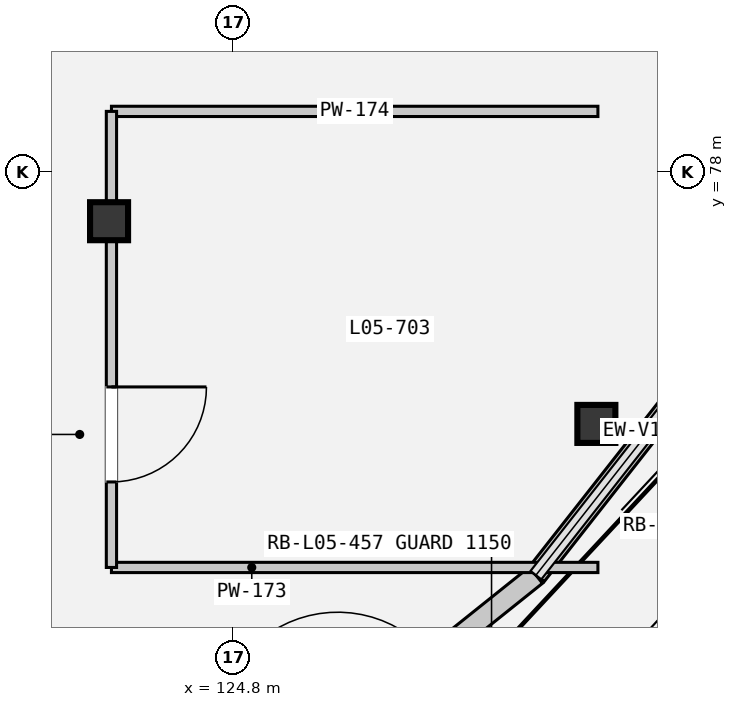
"""IFC4 building model, lengths in metres.
Left out: names, types, materials, properties, quantities, classifications, styles, units other than length and angle.
Written with IfcOpenShell. Run it as: python <this file> out.ifc"""

import sys

from ifc_helpers import new_model, si_unit, direction, frame, frame_2d, origin, origin_2d, place, context, subcontext, project, spatial, rectangle, extrude, element, fill, save


model = new_model("IFC4")
c1 = context("Model", 3, precision=1e-05, world=origin(), true_north=direction((0.0, 1.0)))
c2 = subcontext(c1, "Body", "Model", "MODEL_VIEW")
j1 = project(units=[si_unit("LENGTHUNIT", "METRE"), si_unit("PLANEANGLEUNIT", "RADIAN")], contexts=[c1])
p1 = place(None, origin())
s1 = spatial("IfcSite", under=j1, at=p1, CompositionType="ELEMENT")
p2 = place(p1, origin())
s2 = spatial("IfcBuilding", under=s1, at=p2, CompositionType="ELEMENT")
p3 = place(p2, frame((0.0, 0.0, 24.3)))
s3 = spatial("IfcBuildingStorey", under=s2, at=p3, CompositionType="ELEMENT", Elevation=24.3)
for number, where, z_axis, x_axis in (
    (1, (129.58, 74.688, 0.0), (0.0, 0.0, 1.0), (1.0, 0.0, 0.0)),
    (2, (123.169, 77.355, 0.0), (0.0, 0.0, 1.0), (1.0, 0.0, 0.0)),
):
    element("IfcColumn", number, at=place(p3, frame(where, z_axis=z_axis, x_axis=x_axis)), inside=s3, PredefinedType="COLUMN", context=c2, shape_type="SweptSolid", body=[
        extrude(rectangle(XDim=0.5, YDim=0.5, at=origin_2d()), origin(), (0.0, 0.0, 1.0), 4.5),
    ])
p4 = place(p3, frame((124.818, 69.524, 0.0), z_axis=(0.0, 0.0, 1.0), x_axis=(0.780742210705, 0.624853263113, 0.0)))
e3 = element("IfcWall", 3, at=p4, inside=s3, PredefinedType="SOLIDWALL", context=c2, shape_type="SweptSolid", body=[
    extrude(rectangle(XDim=5.081, YDim=0.275, at=frame_2d((2.54, 0.0))), origin(), (0.0, 0.0, 1.0), 3.58),
])
p5 = place(p4, frame((1.74, 0.0, 0.0)))
e4 = element("IfcOpeningElement", 4, at=p5, cuts=e3, PredefinedType="OPENING", context=c2, shape_type="SweptSolid", body=[
    extrude(rectangle(XDim=1.6, YDim=2.3, at=frame_2d((0.8, 1.15))), frame((0.0, 0.147, 0.0), z_axis=(0.0, -1.0, 0.0), x_axis=(1.0, 0.0, 0.0)), (0.0, 0.0, 1.0), 0.295),
])
p6 = place(p3, frame((128.785, 72.699, 0.0), z_axis=(0.0, 0.0, 1.0), x_axis=(0.617498011037, 0.786572441906, 0.0)))
e5 = element("IfcWall", 5, at=p6, inside=s3, PredefinedType="SOLIDWALL", context=c2, shape_type="SweptSolid", body=[
    extrude(rectangle(XDim=4.833, YDim=0.275, at=frame_2d((2.417, 0.0))), origin(), (0.0, 0.0, 1.0), 1.02),
])
for number, where, z_axis, x_axis in (
    (6, (123.2, 72.8, 0.0), (0.0, 0.0, 1.0), (1.0, 0.0, 0.0)),
    (7, (129.6, 78.8, 0.0), (0.0, 0.0, 1.0), (-1.0, 0.0, 0.0)),
):
    element("IfcWall", number, at=place(p3, frame(where, z_axis=z_axis, x_axis=x_axis)), inside=s3, PredefinedType="PARTITIONING", context=c2, shape_type="SweptSolid", body=[
        extrude(rectangle(XDim=6.4, YDim=0.135, at=frame_2d((3.2, 0.0))), origin(), (0.0, 0.0, 1.0), 3.45),
    ])
p7 = place(p3, frame((123.2, 78.8, 0.0), z_axis=(0.0, 0.0, 1.0), x_axis=(0.0, -1.0, 0.0)))
e8 = element("IfcWall", 8, at=p7, inside=s3, PredefinedType="PARTITIONING", context=c2, shape_type="SweptSolid", body=[
    extrude(rectangle(XDim=6.0, YDim=0.135, at=frame_2d((3.0, 0.0))), origin(), (0.0, 0.0, 1.0), 3.45),
])
p8 = place(p7, frame((3.625, 0.0, 0.0)))
e9 = element("IfcOpeningElement", 9, at=p8, cuts=e8, PredefinedType="OPENING", context=c2, shape_type="SweptSolid", body=[
    extrude(rectangle(XDim=1.25, YDim=2.2, at=frame_2d((0.625, 1.1))), frame((0.0, 0.077, 0.0), z_axis=(0.0, -1.0, 0.0), x_axis=(1.0, 0.0, 0.0)), (0.0, 0.0, 1.0), 0.155),
])
p9 = place(p8, origin())
e10 = element("IfcDoor", 10, at=p9, inside=s3, OperationType="SINGLE_SWING_LEFT", PredefinedType="DOOR", context=c2, shape_type="SweptSolid", body=[
    extrude(rectangle(XDim=1.25, YDim=2.2, at=frame_2d((0.625, 1.1))), frame((0.0, 0.025, 0.0), z_axis=(0.0, -1.0, 0.0), x_axis=(1.0, 0.0, 0.0)), (0.0, 0.0, 1.0), 0.05),
])
fill(e9, e10)
save(model, sys.argv[1])
